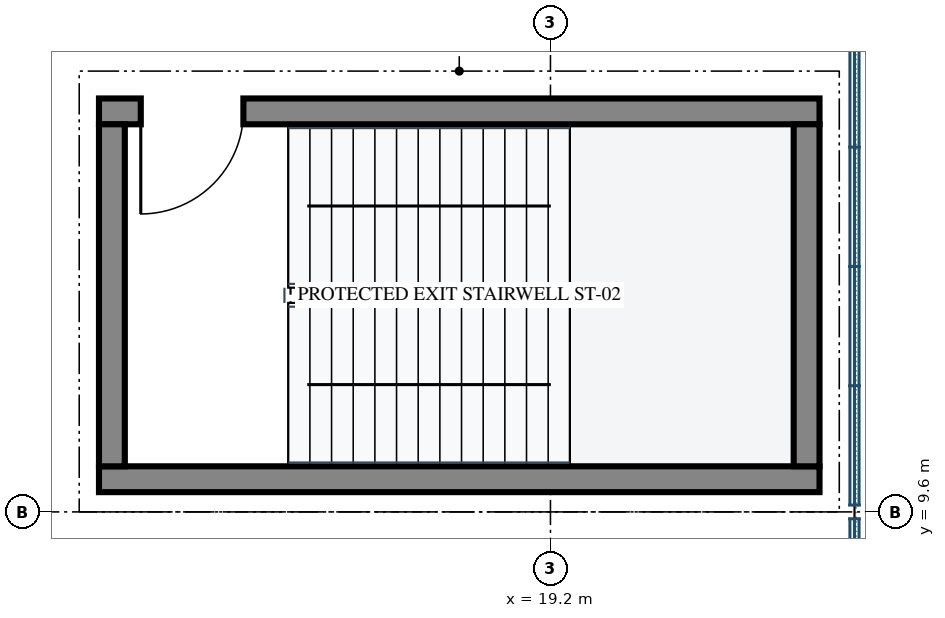
"""IFC4 building model, lengths in metres.
Left out: names, types, materials, properties, quantities, classifications, styles, units other than length and angle.
Written with IfcOpenShell. Run it as: python <this file> out.ifc"""

import sys

from ifc_helpers import new_model, si_unit, direction, frame, frame_2d, origin, place, context, subcontext, project, spatial, rectangle, extrude, element, fill, save


model = new_model("IFC4")
c1 = context("Model", 3, precision=1e-05, world=origin(), true_north=direction((0.0, 1.0)))
c2 = subcontext(c1, "Body", "Model", "MODEL_VIEW")
j1 = project(units=[si_unit("LENGTHUNIT", "METRE"), si_unit("PLANEANGLEUNIT", "RADIAN")], contexts=[c1])
p1 = place(None, origin())
s1 = spatial("IfcSite", under=j1, at=p1, CompositionType="ELEMENT")
p2 = place(p1, origin())
s2 = spatial("IfcBuilding", under=s1, at=p2, CompositionType="ELEMENT")
p3 = place(p2, frame((0.0, 0.0, 15.0)))
s3 = spatial("IfcBuildingStorey", under=s2, at=p3, CompositionType="ELEMENT", Elevation=15.0)
p4 = place(p3, frame((13.26, 10.03, 0.0), z_axis=(0.0, 0.0, 1.0), x_axis=(1.0, 0.0, 0.0)))
e1 = element("IfcWall", 1, at=p4, inside=s3, PredefinedType="SHEAR", context=c2, shape_type="SweptSolid", body=[
    extrude(rectangle(XDim=9.48, YDim=0.34, at=frame_2d((4.74, 0.0))), origin(), (0.0, 0.0, 1.0), 4.52),
])
p5 = place(p3, frame((13.26, 14.87, 0.0), z_axis=(0.0, 0.0, 1.0), x_axis=(1.0, 0.0, 0.0)))
e2 = element("IfcWall", 2, at=p5, inside=s3, PredefinedType="SHEAR", context=c2, shape_type="SweptSolid", body=[
    extrude(rectangle(XDim=9.48, YDim=0.34, at=frame_2d((4.74, 0.0))), origin(), (0.0, 0.0, 1.0), 4.52),
])
p6 = place(p5, frame((0.55, 0.0, 0.0)))
e3 = element("IfcOpeningElement", 3, at=p6, cuts=e2, PredefinedType="OPENING", context=c2, shape_type="SweptSolid", body=[
    extrude(rectangle(XDim=1.35, YDim=2.2, at=frame_2d((0.675, 1.1))), frame((0.0, 0.182, 0.0), z_axis=(0.0, -1.0, 0.0), x_axis=(1.0, 0.0, 0.0)), (0.0, 0.0, 1.0), 0.364),
])
for number, where, z_axis, x_axis in (
    (4, (22.57, 10.2, 0.0), (0.0, 0.0, 1.0), (0.0, 1.0, 0.0)),
    (5, (13.43, 10.2, 0.0), (0.0, 0.0, 1.0), (0.0, 1.0, 0.0)),
):
    element("IfcWall", number, at=place(p3, frame(where, z_axis=z_axis, x_axis=x_axis)), inside=s3, PredefinedType="SHEAR", context=c2, shape_type="SweptSolid", body=[
        extrude(rectangle(XDim=4.5, YDim=0.34, at=frame_2d((2.25, 0.0))), origin(), (0.0, 0.0, 1.0), 4.52),
    ])
p7 = place(p6, frame((1.35, 0.0, 0.0), z_axis=(0.0, 0.0, 1.0), x_axis=(-1.0, 0.0, 0.0)))
e6 = element("IfcDoor", 6, at=p7, inside=s3, OperationType="SINGLE_SWING_RIGHT", PredefinedType="DOOR", context=c2, shape_type="SweptSolid", body=[
    extrude(rectangle(XDim=1.35, YDim=2.2, at=frame_2d((0.675, 1.1))), frame((0.0, 0.025, 0.0), z_axis=(0.0, -1.0, 0.0), x_axis=(1.0, 0.0, 0.0)), (0.0, 0.0, 1.0), 0.05),
])
fill(e3, e6)
save(model, sys.argv[1])
